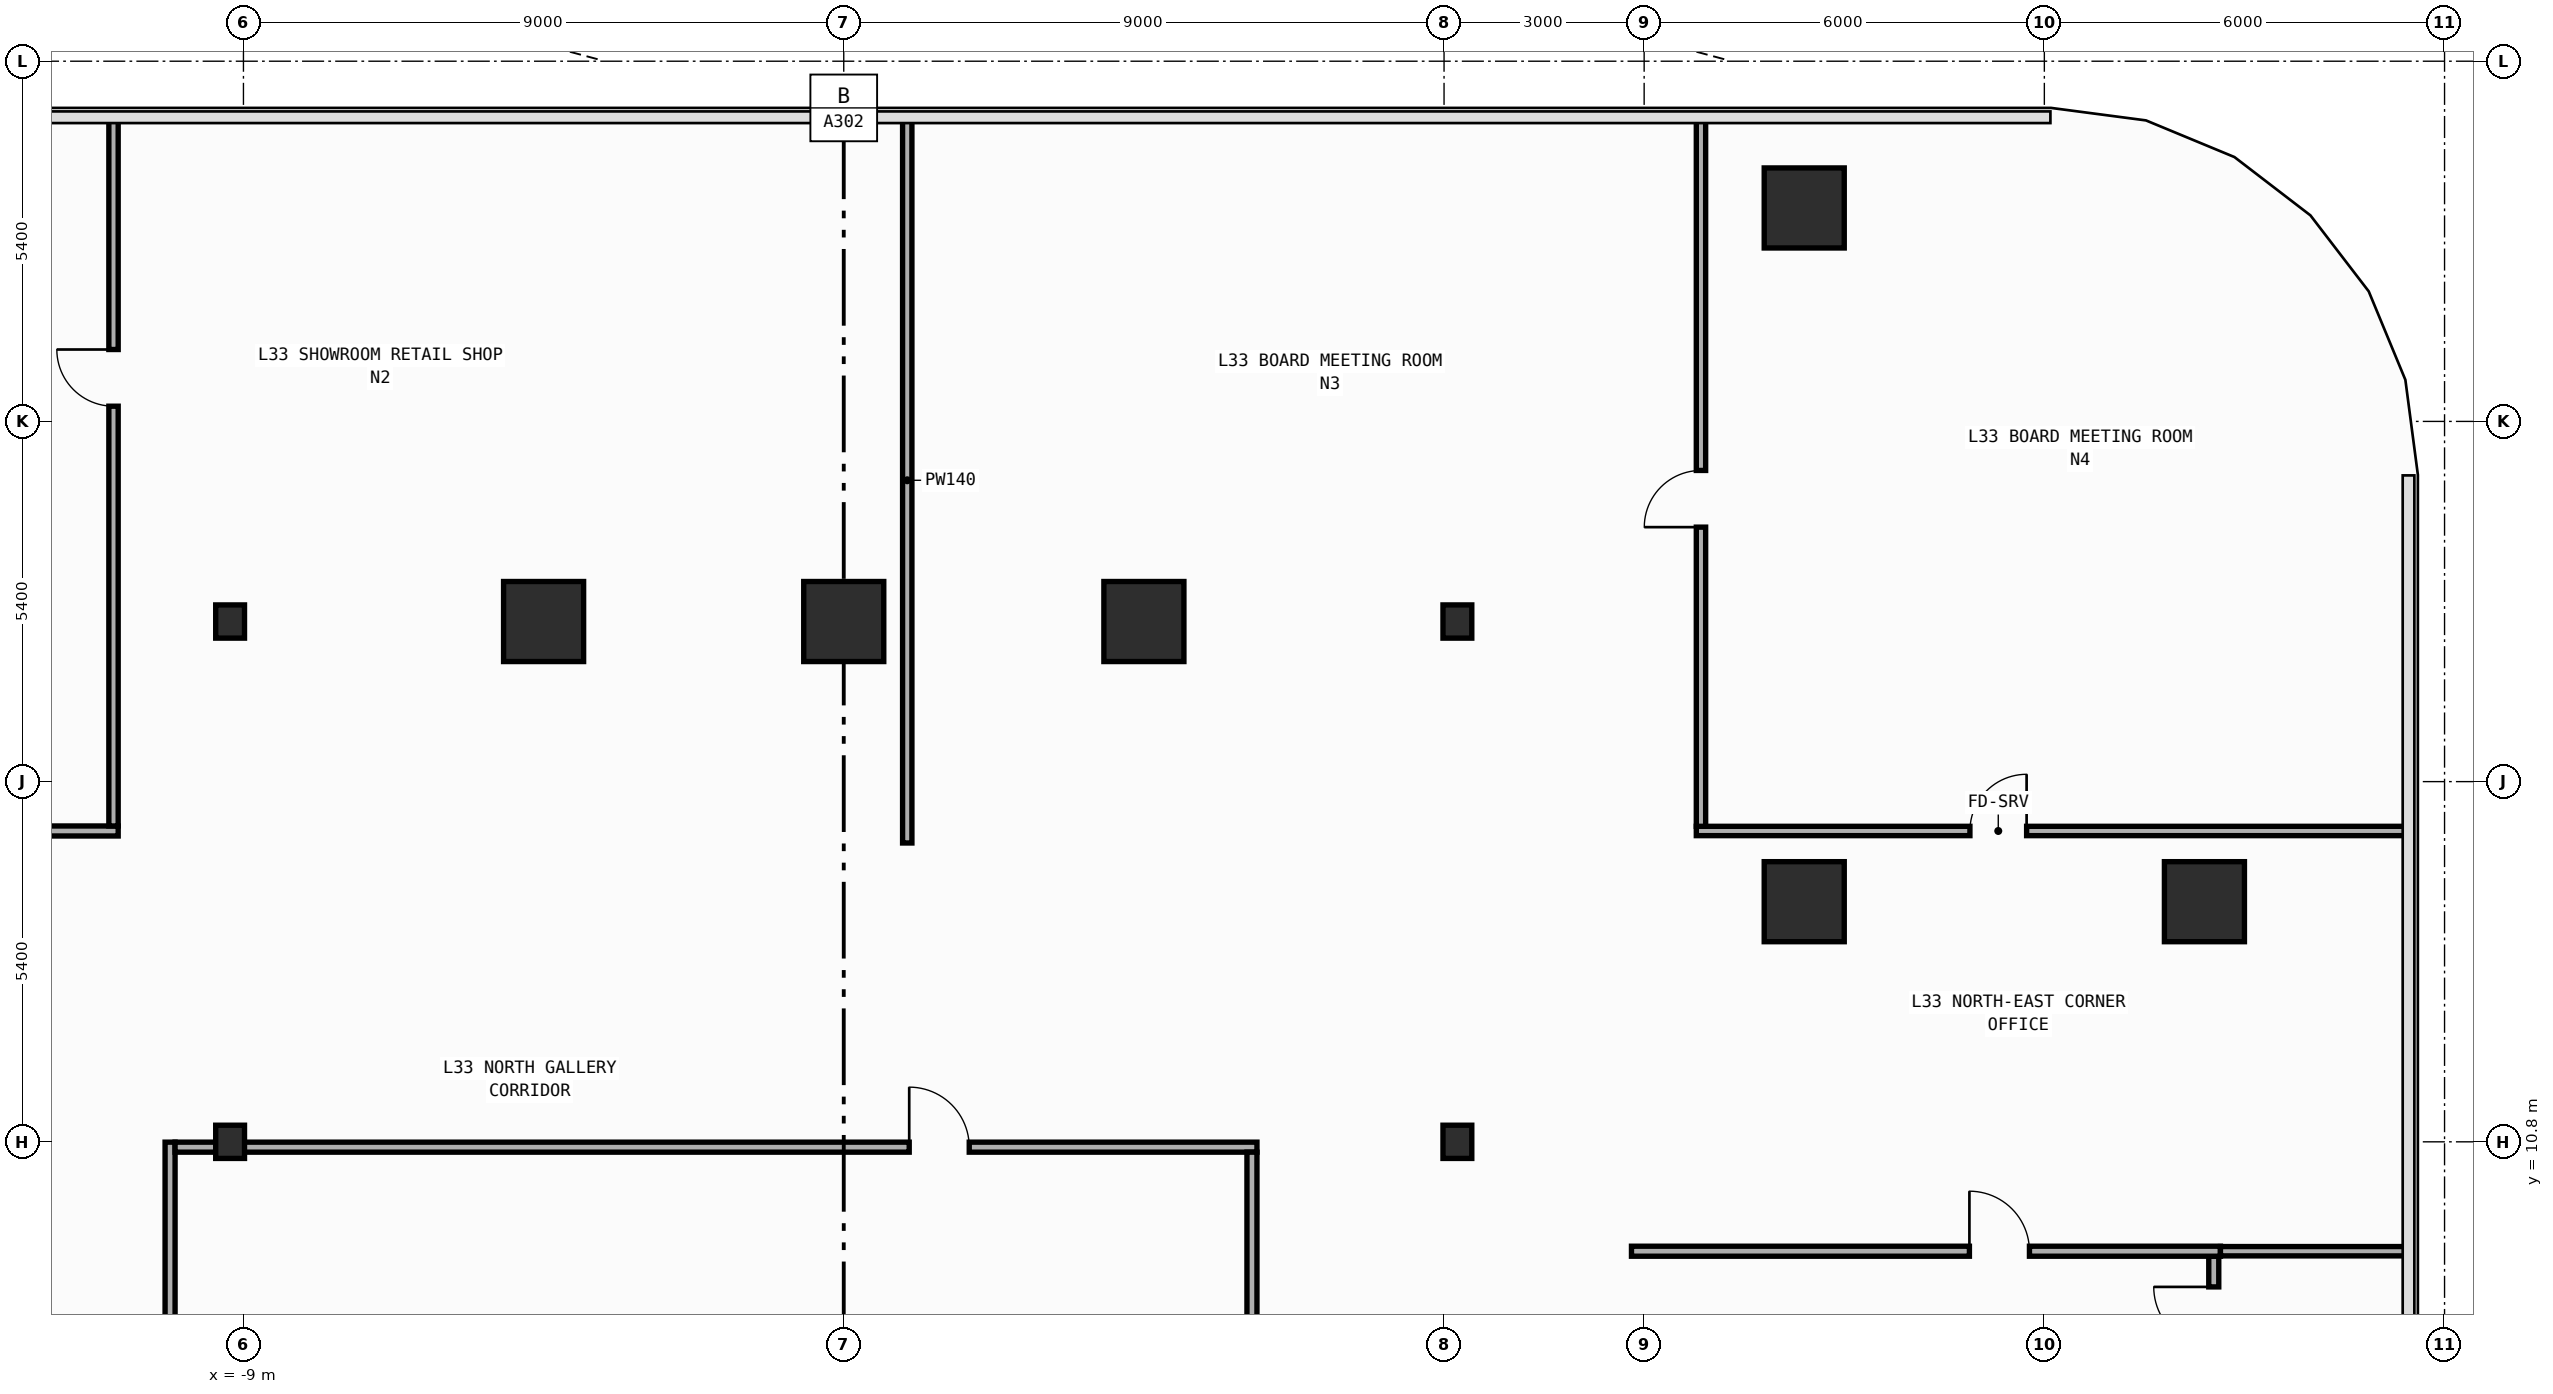
"""IFC4 building model, lengths in metres.
Left out: names, types, materials, properties, quantities, classifications, styles, units other than length and angle.
Written with IfcOpenShell. Run it as: python <this file> out.ifc"""

import sys

from ifc_helpers import new_model, si_unit, direction, frame, frame_2d, origin, origin_2d, place, context, subcontext, project, spatial, rectangle, i_section, extrude, element, fill, save


model = new_model("IFC4")
c1 = context("Model", 3, precision=1e-05, world=origin(), true_north=direction((0.0, 1.0)))
c2 = subcontext(c1, "Body", "Model", "MODEL_VIEW")
j1 = project(units=[si_unit("LENGTHUNIT", "METRE"), si_unit("PLANEANGLEUNIT", "RADIAN")], contexts=[c1])
p1 = place(None, origin())
s1 = spatial("IfcSite", under=j1, at=p1, CompositionType="ELEMENT")
p2 = place(p1, origin())
s2 = spatial("IfcBuilding", under=s1, at=p2, CompositionType="ELEMENT")
p3 = place(p2, frame((0.0, 0.0, 143.6)))
s3 = spatial("IfcBuildingStorey", under=s2, at=p3, CompositionType="ELEMENT", Elevation=143.6)
for number, where, z_axis, x_axis in (
    (1, (-9.2, 10.8, 0.0), (0.0, 0.0, 1.0), (1.0, 0.0, 0.0)),
    (2, (-9.2, 18.6, 0.0), (0.0, 0.0, 1.0), (1.0, 0.0, 0.0)),
    (3, (9.2, 10.8, 0.0), (0.0, 0.0, 1.0), (1.0, 0.0, 0.0)),
    (4, (9.2, 18.6, 0.0), (0.0, 0.0, 1.0), (1.0, 0.0, 0.0)),
):
    element("IfcColumn", number, at=place(p3, frame(where, z_axis=z_axis, x_axis=x_axis)), inside=s3, PredefinedType="COLUMN", context=c2, shape_type="SweptSolid", body=[
        extrude(i_section(OverallWidth=0.432, OverallDepth=0.498, WebThickness=0.045, FlangeThickness=0.07, FilletRadius=0.022, at=origin_2d()), origin(), (0.0, 0.0, 1.0), 4.2),
    ])
for number, where, z_axis, x_axis in (
    (5, (20.4, 14.4, 0.0), (0.0, 0.0, 1.0), (1.0, 0.0, 0.0)),
    (6, (14.4, 14.4, 0.0), (0.0, 0.0, 1.0), (1.0, 0.0, 0.0)),
    (7, (-4.5, 18.6, 0.0), (0.0, 0.0, 1.0), (1.0, 0.0, 0.0)),
    (8, (0.0, 18.6, 0.0), (0.0, 0.0, 1.0), (1.0, 0.0, 0.0)),
    (9, (4.5, 18.6, 0.0), (0.0, 0.0, 1.0), (1.0, 0.0, 0.0)),
    (10, (14.4, 24.8, 0.0), (0.0, 0.0, 1.0), (1.0, 0.0, 0.0)),
):
    element("IfcColumn", number, at=place(p3, frame(where, z_axis=z_axis, x_axis=x_axis)), inside=s3, PredefinedType="COLUMN", context=c2, shape_type="SweptSolid", body=[
        extrude(rectangle(XDim=1.2, YDim=1.2, at=origin_2d()), origin(), (0.0, 0.0, 1.0), 4.2),
    ])
p4 = place(p3, frame((-11.99, 15.46, 0.0), z_axis=(0.0, 0.0, 1.0), x_axis=(1.0, 0.0, 0.0)))
e11 = element("IfcWall", 11, at=p4, inside=s3, PredefinedType="PARTITIONING", context=c2, shape_type="SweptSolid", body=[
    extrude(rectangle(XDim=1.112, YDim=0.15, at=frame_2d((0.556, 0.0))), origin(), (0.0, 0.0, 1.0), 3.94),
])
p5 = place(p3, frame((-10.1, -7.12, 0.0), z_axis=(0.0, 0.0, 1.0), x_axis=(0.0, 1.0, 0.0)))
e12 = element("IfcWall", 12, at=p5, inside=s3, PredefinedType="PARTITIONING", context=c2, shape_type="SweptSolid", body=[
    extrude(rectangle(XDim=17.915, YDim=0.15, at=frame_2d((8.958, 0.0))), origin(), (0.0, 0.0, 1.0), 3.94),
])
p6 = place(p5, frame((1.265, 0.0, 0.0)))
e13 = element("IfcOpeningElement", 13, at=p6, cuts=e12, PredefinedType="OPENING", context=c2, shape_type="SweptSolid", body=[
    extrude(rectangle(XDim=0.9, YDim=2.15, at=frame_2d((0.45, 1.075))), frame((0.0, 0.085, 0.0), z_axis=(0.0, -1.0, 0.0), x_axis=(1.0, 0.0, 0.0)), (0.0, 0.0, 1.0), 0.17),
])
p7 = place(p3, frame((-10.025, 10.72, 0.0), z_axis=(0.0, 0.0, 1.0), x_axis=(1.0, 0.0, 0.0)))
e14 = element("IfcWall", 14, at=p7, inside=s3, PredefinedType="PARTITIONING", context=c2, shape_type="SweptSolid", body=[
    extrude(rectangle(XDim=16.22, YDim=0.15, at=frame_2d((8.11, 0.0))), origin(), (0.0, 0.0, 1.0), 3.24),
])
p8 = place(p7, frame((11.007, 0.0, 0.0)))
e15 = element("IfcOpeningElement", 15, at=p8, cuts=e14, PredefinedType="OPENING", context=c2, shape_type="SweptSolid", body=[
    extrude(rectangle(XDim=0.9, YDim=2.15, at=frame_2d((0.45, 1.075))), frame((0.0, 0.085, 0.0), z_axis=(0.0, -1.0, 0.0), x_axis=(1.0, 0.0, 0.0)), (0.0, 0.0, 1.0), 0.17),
])
p9 = place(p3, frame((6.12, -7.28, 0.0), z_axis=(0.0, 0.0, 1.0), x_axis=(0.0, 1.0, 0.0)))
e16 = element("IfcWall", 16, at=p9, inside=s3, PredefinedType="PARTITIONING", context=c2, shape_type="SweptSolid", body=[
    extrude(rectangle(XDim=17.925, YDim=0.15, at=frame_2d((8.962, 0.0))), origin(), (0.0, 0.0, 1.0), 3.94),
])
p10 = place(p9, frame((1.467, 0.0, 0.0)))
e17 = element("IfcOpeningElement", 17, at=p10, cuts=e16, PredefinedType="OPENING", context=c2, shape_type="SweptSolid", body=[
    extrude(rectangle(XDim=0.9, YDim=2.15, at=frame_2d((0.45, 1.075))), frame((0.0, 0.085, 0.0), z_axis=(0.0, -1.0, 0.0), x_axis=(1.0, 0.0, 0.0)), (0.0, 0.0, 1.0), 0.17),
])
p11 = place(p3, frame((20.54, 7.06, 0.0), z_axis=(0.0, 0.0, 1.0), x_axis=(0.0, 1.0, 0.0)))
e18 = element("IfcWall", 18, at=p11, inside=s3, PredefinedType="PARTITIONING", context=c2, shape_type="SweptSolid", body=[
    extrude(rectangle(XDim=2.025, YDim=0.15, at=frame_2d((1.012, 0.0))), origin(), (0.0, 0.0, 1.0), 3.94),
])
p12 = place(p11, frame((0.665, 0.0, 0.0)))
e19 = element("IfcOpeningElement", 19, at=p12, cuts=e18, PredefinedType="OPENING", context=c2, shape_type="SweptSolid", body=[
    extrude(rectangle(XDim=0.9, YDim=2.15, at=frame_2d((0.45, 1.075))), frame((0.0, 0.085, 0.0), z_axis=(0.0, -1.0, 0.0), x_axis=(1.0, 0.0, 0.0)), (0.0, 0.0, 1.0), 0.17),
])
p13 = place(p3, frame((11.81, 9.16, 0.0), z_axis=(0.0, 0.0, 1.0), x_axis=(1.0, 0.0, 0.0)))
e20 = element("IfcWall", 20, at=p13, inside=s3, PredefinedType="PARTITIONING", context=c2, shape_type="SweptSolid", body=[
    extrude(rectangle(XDim=8.83, YDim=0.15, at=frame_2d((4.415, 0.0))), origin(), (0.0, 0.0, 1.0), 3.94),
])
p14 = place(p13, frame((5.067, 0.0, 0.0)))
e21 = element("IfcOpeningElement", 21, at=p14, cuts=e20, PredefinedType="OPENING", context=c2, shape_type="SweptSolid", body=[
    extrude(rectangle(XDim=0.9, YDim=2.15, at=frame_2d((0.45, 1.075))), frame((0.0, 0.085, 0.0), z_axis=(0.0, -1.0, 0.0), x_axis=(1.0, 0.0, 0.0)), (0.0, 0.0, 1.0), 0.17),
])
p15 = place(p3, frame((20.64, 9.16, 0.0), z_axis=(0.0, 0.0, 1.0), x_axis=(1.0, 0.0, 0.0)))
e22 = element("IfcWall", 22, at=p15, inside=s3, PredefinedType="PARTITIONING", context=c2, shape_type="SweptSolid", body=[
    extrude(rectangle(XDim=2.815, YDim=0.14, at=frame_2d((1.408, 0.0))), origin(), (0.0, 0.0, 1.0), 3.94),
])
p16 = place(p3, frame((12.782, 15.46, 0.0), z_axis=(0.0, 0.0, 1.0), x_axis=(1.0, 0.0, 0.0)))
e23 = element("IfcWall", 23, at=p16, inside=s3, PredefinedType="PARTITIONING", context=c2, shape_type="SweptSolid", body=[
    extrude(rectangle(XDim=10.673, YDim=0.14, at=frame_2d((5.336, 0.0))), origin(), (0.0, 0.0, 1.0), 3.94),
])
p17 = place(p16, frame((4.102, 0.0, 0.0)))
e24 = element("IfcOpeningElement", 24, at=p17, cuts=e23, PredefinedType="OPENING", context=c2, shape_type="SweptSolid", body=[
    extrude(rectangle(XDim=0.85, YDim=2.1, at=frame_2d((0.425, 1.05))), frame((0.0, 0.08, 0.0), z_axis=(0.0, -1.0, 0.0), x_axis=(1.0, 0.0, 0.0)), (0.0, 0.0, 1.0), 0.16),
])
p18 = place(p3, frame((-10.948, 15.535, 0.0), z_axis=(0.0, 0.0, 1.0), x_axis=(0.0, 1.0, 0.0)))
e25 = element("IfcWall", 25, at=p18, inside=s3, PredefinedType="PARTITIONING", context=c2, shape_type="SweptSolid", body=[
    extrude(rectangle(XDim=10.62, YDim=0.14, at=frame_2d((5.31, 0.0))), origin(), (0.0, 0.0, 1.0), 3.94),
])
p19 = place(p18, frame((6.293, 0.0, 0.0)))
e26 = element("IfcOpeningElement", 26, at=p19, cuts=e25, PredefinedType="OPENING", context=c2, shape_type="SweptSolid", body=[
    extrude(rectangle(XDim=0.85, YDim=2.1, at=frame_2d((0.425, 1.05))), frame((0.0, 0.08, 0.0), z_axis=(0.0, -1.0, 0.0), x_axis=(1.0, 0.0, 0.0)), (0.0, 0.0, 1.0), 0.16),
])
p20 = place(p3, frame((0.952, 15.28, 0.0), z_axis=(0.0, 0.0, 1.0), x_axis=(0.0, 1.0, 0.0)))
e27 = element("IfcWall", 27, at=p20, inside=s3, PredefinedType="PARTITIONING", context=c2, shape_type="SweptSolid", body=[
    extrude(rectangle(XDim=10.875, YDim=0.14, at=frame_2d((5.438, 0.0))), origin(), (0.0, 0.0, 1.0), 3.94),
])
p21 = place(p3, frame((12.852, 15.53, 0.0), z_axis=(0.0, 0.0, 1.0), x_axis=(0.0, 1.0, 0.0)))
e28 = element("IfcWall", 28, at=p21, inside=s3, PredefinedType="PARTITIONING", context=c2, shape_type="SweptSolid", body=[
    extrude(rectangle(XDim=10.625, YDim=0.14, at=frame_2d((5.312, 0.0))), origin(), (0.0, 0.0, 1.0), 3.94),
])
p22 = place(p21, frame((4.485, 0.0, 0.0)))
e29 = element("IfcOpeningElement", 29, at=p22, cuts=e28, PredefinedType="OPENING", context=c2, shape_type="SweptSolid", body=[
    extrude(rectangle(XDim=0.85, YDim=2.1, at=frame_2d((0.425, 1.05))), frame((0.0, 0.08, 0.0), z_axis=(0.0, -1.0, 0.0), x_axis=(1.0, 0.0, 0.0)), (0.0, 0.0, 1.0), 0.16),
])
p23 = place(p8, origin())
e30 = element("IfcDoor", 30, at=p23, inside=s3, OperationType="SINGLE_SWING_LEFT", PredefinedType="DOOR", context=c2, shape_type="SweptSolid", body=[
    extrude(rectangle(XDim=0.9, YDim=2.15, at=frame_2d((0.45, 1.075))), frame((0.0, 0.025, 0.0), z_axis=(0.0, -1.0, 0.0), x_axis=(1.0, 0.0, 0.0)), (0.0, 0.0, 1.0), 0.05),
])
fill(e15, e30)
p24 = place(p12, origin())
e31 = element("IfcDoor", 31, at=p24, inside=s3, OperationType="SINGLE_SWING_RIGHT", PredefinedType="DOOR", context=c2, shape_type="SweptSolid", body=[
    extrude(rectangle(XDim=0.9, YDim=2.15, at=frame_2d((0.45, 1.075))), frame((0.0, 0.025, 0.0), z_axis=(0.0, -1.0, 0.0), x_axis=(1.0, 0.0, 0.0)), (0.0, 0.0, 1.0), 0.05),
])
fill(e19, e31)
p25 = place(p14, origin())
e32 = element("IfcDoor", 32, at=p25, inside=s3, OperationType="SINGLE_SWING_LEFT", PredefinedType="DOOR", context=c2, shape_type="SweptSolid", body=[
    extrude(rectangle(XDim=0.9, YDim=2.15, at=frame_2d((0.45, 1.075))), frame((0.0, 0.025, 0.0), z_axis=(0.0, -1.0, 0.0), x_axis=(1.0, 0.0, 0.0)), (0.0, 0.0, 1.0), 0.05),
])
fill(e21, e32)
p26 = place(p17, origin())
e33 = element("IfcDoor", 33, at=p26, inside=s3, OperationType="SINGLE_SWING_RIGHT", PredefinedType="DOOR", context=c2, shape_type="SweptSolid", body=[
    extrude(rectangle(XDim=0.85, YDim=2.1, at=frame_2d((0.425, 1.05))), frame((0.0, 0.025, 0.0), z_axis=(0.0, -1.0, 0.0), x_axis=(1.0, 0.0, 0.0)), (0.0, 0.0, 1.0), 0.05),
])
fill(e24, e33)
p27 = place(p22, origin())
e34 = element("IfcDoor", 34, at=p27, inside=s3, OperationType="SINGLE_SWING_LEFT", PredefinedType="DOOR", context=c2, shape_type="SweptSolid", body=[
    extrude(rectangle(XDim=0.85, YDim=2.1, at=frame_2d((0.425, 1.05))), frame((0.0, 0.025, 0.0), z_axis=(0.0, -1.0, 0.0), x_axis=(1.0, 0.0, 0.0)), (0.0, 0.0, 1.0), 0.05),
])
fill(e29, e34)
p28 = place(p19, origin())
e35 = element("IfcDoor", 35, at=p28, inside=s3, OperationType="SINGLE_SWING_RIGHT", PredefinedType="DOOR", context=c2, shape_type="SweptSolid", body=[
    extrude(rectangle(XDim=0.85, YDim=2.1, at=frame_2d((0.425, 1.05))), frame((0.0, 0.025, 0.0), z_axis=(0.0, -1.0, 0.0), x_axis=(1.0, 0.0, 0.0)), (0.0, 0.0, 1.0), 0.05),
])
fill(e26, e35)
save(model, sys.argv[1])
